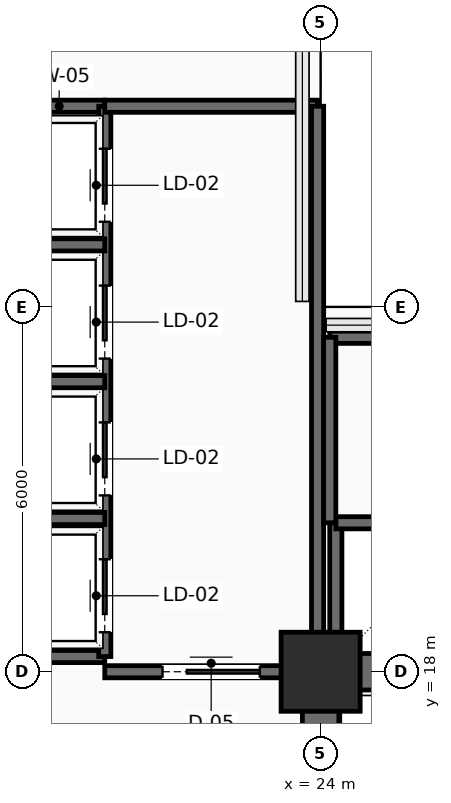
"""IFC4 building model, lengths in metres.
Left out: names, types, materials, properties, quantities, classifications, styles, units other than length and angle.
Written with IfcOpenShell. Run it as: python <this file> out.ifc"""

import sys

from ifc_helpers import new_model, si_unit, direction, frame, frame_2d, origin, origin_2d, place, context, subcontext, project, spatial, rectangle, extrude, element, fill, save


model = new_model("IFC4")
c1 = context("Model", 3, precision=1e-05, world=origin(), true_north=direction((0.0, 1.0)))
c2 = subcontext(c1, "Body", "Model", "MODEL_VIEW")
j1 = project(units=[si_unit("LENGTHUNIT", "METRE"), si_unit("PLANEANGLEUNIT", "RADIAN")], contexts=[c1])
p1 = place(None, origin())
s1 = spatial("IfcSite", under=j1, at=p1, CompositionType="ELEMENT")
p2 = place(p1, origin())
s2 = spatial("IfcBuilding", under=s1, at=p2, CompositionType="ELEMENT")
p3 = place(p2, frame((0.0, 0.0, 83.1)))
s3 = spatial("IfcBuildingStorey", under=s2, at=p3, CompositionType="ELEMENT", Elevation=83.1)
p4 = place(p3, frame((24.0, 18.0, 0.0), z_axis=(0.0, 0.0, 1.0), x_axis=(1.0, 0.0, 0.0)))
e1 = element("IfcColumn", 1, at=p4, inside=s3, PredefinedType="COLUMN", context=c2, shape_type="SweptSolid", body=[
    extrude(rectangle(XDim=1.3, YDim=1.3, at=origin_2d()), origin(), (0.0, 0.0, 1.0), 3.9),
])
p5 = place(p3, frame((24.0, 18.0, 0.0), z_axis=(0.0, 0.0, 1.0), x_axis=(1.0, 0.0, 0.0)))
e2 = element("IfcWall", 2, at=p5, inside=s3, PredefinedType="SHEAR", context=c2, shape_type="SweptSolid", body=[
    extrude(rectangle(XDim=9.6, YDim=0.6, at=frame_2d((4.8, 0.0))), origin(), (0.0, 0.0, 1.0), 3.65),
])
p6 = place(p3, frame((24.0, 6.0, 0.0), z_axis=(0.0, 0.0, 1.0), x_axis=(0.0, 1.0, 0.0)))
e3 = element("IfcWall", 3, at=p6, inside=s3, PredefinedType="SHEAR", context=c2, shape_type="SweptSolid", body=[
    extrude(rectangle(XDim=12.0, YDim=0.6, at=frame_2d((6.0, 0.0))), origin(), (0.0, 0.0, 1.0), 3.65),
])
p7 = place(p6, frame((7.15, 0.0, 0.0)))
e4 = element("IfcOpeningElement", 4, at=p7, cuts=e3, PredefinedType="OPENING", context=c2, shape_type="SweptSolid", body=[
    extrude(rectangle(XDim=1.6, YDim=2.3, at=frame_2d((0.8, 1.15))), frame((0.0, 0.31, 0.0), z_axis=(0.0, -1.0, 0.0), x_axis=(1.0, 0.0, 0.0)), (0.0, 0.0, 1.0), 0.62),
])
for number, where, z_axis, x_axis in (
    (5, (18.1, 27.3, 0.0), (0.0, 0.0, 1.0), (1.0, 0.0, 0.0)),
    (6, (18.1, 18.25, 0.0), (0.0, 0.0, 1.0), (1.0, 0.0, 0.0)),
):
    element("IfcWall", number, at=place(p3, frame(where, z_axis=z_axis, x_axis=x_axis)), inside=s3, PredefinedType="SHEAR", context=c2, shape_type="SweptSolid", body=[
        extrude(rectangle(XDim=2.35, YDim=0.2, at=frame_2d((1.175, 0.0))), origin(), (0.0, 0.0, 1.0), 3.65),
    ])
p8 = place(p3, frame((20.45, 18.25, 0.0), z_axis=(0.0, 0.0, 1.0), x_axis=(0.0, 1.0, 0.0)))
e7 = element("IfcWall", 7, at=p8, inside=s3, PredefinedType="SHEAR", context=c2, shape_type="SweptSolid", body=[
    extrude(rectangle(XDim=9.05, YDim=0.2, at=frame_2d((4.525, 0.0))), origin(), (0.0, 0.0, 1.0), 3.65),
])
p9 = place(p8, frame((0.4, 0.0, 0.0)))
e8 = element("IfcOpeningElement", 8, at=p9, cuts=e7, PredefinedType="OPENING", context=c2, shape_type="SweptSolid", body=[
    extrude(rectangle(XDim=1.2, YDim=2.2, at=frame_2d((0.6, 1.1))), frame((0.0, 0.11, 0.0), z_axis=(0.0, -1.0, 0.0), x_axis=(1.0, 0.0, 0.0)), (0.0, 0.0, 1.0), 0.22),
])
p10 = place(p8, frame((2.65, 0.0, 0.0)))
e9 = element("IfcOpeningElement", 9, at=p10, cuts=e7, PredefinedType="OPENING", context=c2, shape_type="SweptSolid", body=[
    extrude(rectangle(XDim=1.2, YDim=2.2, at=frame_2d((0.6, 1.1))), frame((0.0, 0.11, 0.0), z_axis=(0.0, -1.0, 0.0), x_axis=(1.0, 0.0, 0.0)), (0.0, 0.0, 1.0), 0.22),
])
p11 = place(p8, frame((4.9, 0.0, 0.0)))
e10 = element("IfcOpeningElement", 10, at=p11, cuts=e7, PredefinedType="OPENING", context=c2, shape_type="SweptSolid", body=[
    extrude(rectangle(XDim=1.2, YDim=2.2, at=frame_2d((0.6, 1.1))), frame((0.0, 0.11, 0.0), z_axis=(0.0, -1.0, 0.0), x_axis=(1.0, 0.0, 0.0)), (0.0, 0.0, 1.0), 0.22),
])
p12 = place(p8, frame((7.15, 0.0, 0.0)))
e11 = element("IfcOpeningElement", 11, at=p12, cuts=e7, PredefinedType="OPENING", context=c2, shape_type="SweptSolid", body=[
    extrude(rectangle(XDim=1.2, YDim=2.2, at=frame_2d((0.6, 1.1))), frame((0.0, 0.11, 0.0), z_axis=(0.0, -1.0, 0.0), x_axis=(1.0, 0.0, 0.0)), (0.0, 0.0, 1.0), 0.22),
])
for number, where, z_axis, x_axis in (
    (12, (18.15, 20.52, 0.0), (0.0, 0.0, 1.0), (1.0, 0.0, 0.0)),
    (13, (18.15, 22.77, 0.0), (0.0, 0.0, 1.0), (1.0, 0.0, 0.0)),
    (14, (18.15, 25.02, 0.0), (0.0, 0.0, 1.0), (1.0, 0.0, 0.0)),
):
    element("IfcWall", number, at=place(p3, frame(where, z_axis=z_axis, x_axis=x_axis)), inside=s3, PredefinedType="SHEAR", context=c2, shape_type="SweptSolid", body=[
        extrude(rectangle(XDim=2.3, YDim=0.2, at=frame_2d((1.15, 0.0))), origin(), (0.0, 0.0, 1.0), 3.65),
    ])
p13 = place(p3, frame((20.45, 18.0, 0.0), z_axis=(0.0, 0.0, 1.0), x_axis=(1.0, 0.0, 0.0)))
e15 = element("IfcWall", 15, at=p13, inside=s3, PredefinedType="SHEAR", context=c2, shape_type="SweptSolid", body=[
    extrude(rectangle(XDim=3.5, YDim=0.2, at=frame_2d((1.75, 0.0))), origin(), (0.0, 0.0, 1.0), 3.65),
])
p14 = place(p13, frame((0.95, 0.0, 0.0)))
e16 = element("IfcOpeningElement", 16, at=p14, cuts=e15, PredefinedType="OPENING", context=c2, shape_type="SweptSolid", body=[
    extrude(rectangle(XDim=1.6, YDim=2.3, at=frame_2d((0.8, 1.15))), frame((0.0, 0.11, 0.0), z_axis=(0.0, -1.0, 0.0), x_axis=(1.0, 0.0, 0.0)), (0.0, 0.0, 1.0), 0.22),
])
p15 = place(p3, frame((20.45, 27.3, 0.0), z_axis=(0.0, 0.0, 1.0), x_axis=(1.0, 0.0, 0.0)))
e17 = element("IfcWall", 17, at=p15, inside=s3, PredefinedType="SHEAR", context=c2, shape_type="SweptSolid", body=[
    extrude(rectangle(XDim=3.5, YDim=0.2, at=frame_2d((1.75, 0.0))), origin(), (0.0, 0.0, 1.0), 3.65),
])
p16 = place(p3, frame((23.95, 18.0, 0.0), z_axis=(0.0, 0.0, 1.0), x_axis=(0.0, 1.0, 0.0)))
e18 = element("IfcWall", 18, at=p16, inside=s3, PredefinedType="SHEAR", context=c2, shape_type="SweptSolid", body=[
    extrude(rectangle(XDim=9.3, YDim=0.2, at=frame_2d((4.65, 0.0))), origin(), (0.0, 0.0, 1.0), 3.65),
])
p17 = place(p3, frame((24.25, 18.1, 0.0), z_axis=(0.0, 0.0, 1.0), x_axis=(0.0, 1.0, 0.0)))
e19 = element("IfcWall", 19, at=p17, inside=s3, PredefinedType="SHEAR", context=c2, shape_type="SweptSolid", body=[
    extrude(rectangle(XDim=2.35, YDim=0.2, at=frame_2d((1.175, 0.0))), origin(), (0.0, 0.0, 1.0), 3.65),
])
p18 = place(p3, frame((24.25, 20.45, 0.0), z_axis=(0.0, 0.0, 1.0), x_axis=(1.0, 0.0, 0.0)))
e20 = element("IfcWall", 20, at=p18, inside=s3, PredefinedType="SHEAR", context=c2, shape_type="SweptSolid", body=[
    extrude(rectangle(XDim=9.05, YDim=0.2, at=frame_2d((4.525, 0.0))), origin(), (0.0, 0.0, 1.0), 3.65),
])
p19 = place(p3, frame((24.15, 23.5, 0.0), z_axis=(0.0, 0.0, 1.0), x_axis=(1.0, 0.0, 0.0)))
e21 = element("IfcWall", 21, at=p19, inside=s3, PredefinedType="SHEAR", context=c2, shape_type="SweptSolid", body=[
    extrude(rectangle(XDim=9.15, YDim=0.2, at=frame_2d((4.575, 0.0))), origin(), (0.0, 0.0, 1.0), 3.65),
])
p20 = place(p3, frame((24.15, 20.45, 0.0), z_axis=(0.0, 0.0, 1.0), x_axis=(0.0, 1.0, 0.0)))
e22 = element("IfcWall", 22, at=p20, inside=s3, PredefinedType="SHEAR", context=c2, shape_type="SweptSolid", body=[
    extrude(rectangle(XDim=3.05, YDim=0.2, at=frame_2d((1.525, 0.0))), origin(), (0.0, 0.0, 1.0), 3.65),
])
p21 = place(p9, origin())
e23 = element("IfcDoor", 23, at=p21, inside=s3, OperationType="SLIDING_TO_RIGHT", PredefinedType="DOOR", context=c2, shape_type="SweptSolid", body=[
    extrude(rectangle(XDim=1.2, YDim=2.2, at=frame_2d((0.6, 1.1))), frame((0.0, 0.025, 0.0), z_axis=(0.0, -1.0, 0.0), x_axis=(1.0, 0.0, 0.0)), (0.0, 0.0, 1.0), 0.05),
])
fill(e8, e23)
p22 = place(p10, origin())
e24 = element("IfcDoor", 24, at=p22, inside=s3, OperationType="SLIDING_TO_RIGHT", PredefinedType="DOOR", context=c2, shape_type="SweptSolid", body=[
    extrude(rectangle(XDim=1.2, YDim=2.2, at=frame_2d((0.6, 1.1))), frame((0.0, 0.025, 0.0), z_axis=(0.0, -1.0, 0.0), x_axis=(1.0, 0.0, 0.0)), (0.0, 0.0, 1.0), 0.05),
])
fill(e9, e24)
p23 = place(p11, origin())
e25 = element("IfcDoor", 25, at=p23, inside=s3, OperationType="SLIDING_TO_RIGHT", PredefinedType="DOOR", context=c2, shape_type="SweptSolid", body=[
    extrude(rectangle(XDim=1.2, YDim=2.2, at=frame_2d((0.6, 1.1))), frame((0.0, 0.025, 0.0), z_axis=(0.0, -1.0, 0.0), x_axis=(1.0, 0.0, 0.0)), (0.0, 0.0, 1.0), 0.05),
])
fill(e10, e25)
p24 = place(p12, origin())
e26 = element("IfcDoor", 26, at=p24, inside=s3, OperationType="SLIDING_TO_RIGHT", PredefinedType="DOOR", context=c2, shape_type="SweptSolid", body=[
    extrude(rectangle(XDim=1.2, YDim=2.2, at=frame_2d((0.6, 1.1))), frame((0.0, 0.025, 0.0), z_axis=(0.0, -1.0, 0.0), x_axis=(1.0, 0.0, 0.0)), (0.0, 0.0, 1.0), 0.05),
])
fill(e11, e26)
p25 = place(p14, origin())
e27 = element("IfcDoor", 27, at=p25, inside=s3, OperationType="DOUBLE_DOOR_SLIDING", PredefinedType="DOOR", context=c2, shape_type="SweptSolid", body=[
    extrude(rectangle(XDim=1.6, YDim=2.3, at=frame_2d((0.8, 1.15))), frame((0.0, 0.025, 0.0), z_axis=(0.0, -1.0, 0.0), x_axis=(1.0, 0.0, 0.0)), (0.0, 0.0, 1.0), 0.05),
])
fill(e16, e27)
save(model, sys.argv[1])
